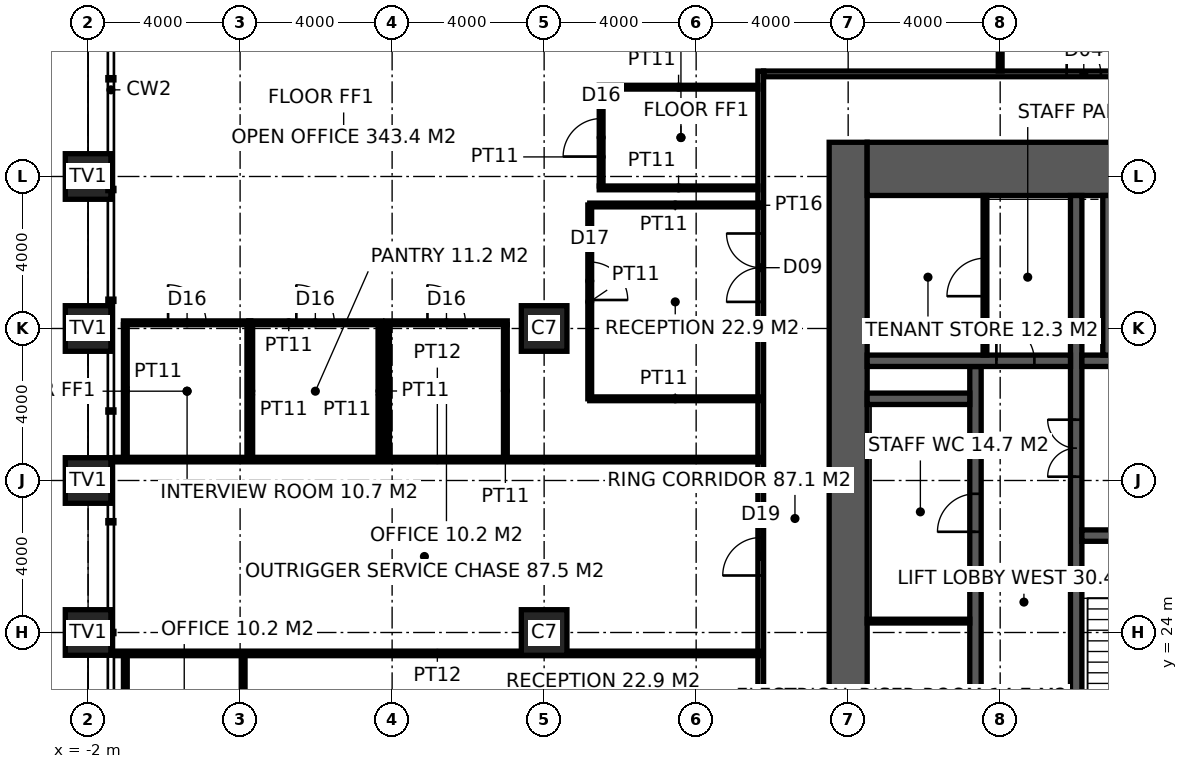
"""IFC4 building model, lengths in metres.
Left out: names, types, materials, properties, quantities, classifications, styles, units other than length and angle.
Written with IfcOpenShell. Run it as: python <this file> out.ifc"""

import sys

from ifc_helpers import new_model, si_unit, direction, frame, frame_2d, origin, origin_2d, place, context, subcontext, project, spatial, rectangle, hollow_rectangle, extrude, element, fill, save


model = new_model("IFC4")
c1 = context("Model", 3, precision=1e-05, world=origin(), true_north=direction((0.0, 1.0)))
c2 = subcontext(c1, "Body", "Model", "MODEL_VIEW")
j1 = project(units=[si_unit("LENGTHUNIT", "METRE"), si_unit("PLANEANGLEUNIT", "RADIAN")], contexts=[c1])
p1 = place(None, origin())
s1 = spatial("IfcSite", under=j1, at=p1, CompositionType="ELEMENT")
p2 = place(p1, origin())
s2 = spatial("IfcBuilding", under=s1, at=p2, CompositionType="ELEMENT")
p3 = place(p2, frame((0.0, 0.0, 43.0)))
s3 = spatial("IfcBuildingStorey", under=s2, at=p3, CompositionType="ELEMENT", Elevation=43.0)
for number, where, z_axis, x_axis in (
    (1, (-2.0, 24.0, 0.0), (0.0, 0.0, 1.0), (1.0, 0.0, 0.0)),
    (2, (-2.0, 28.0, 0.0), (0.0, 0.0, 1.0), (1.0, 0.0, 0.0)),
    (3, (-2.0, 32.0, 0.0), (0.0, 0.0, 1.0), (1.0, 0.0, 0.0)),
    (4, (-2.0, 36.0, 0.0), (0.0, 0.0, 1.0), (1.0, 0.0, 0.0)),
):
    element("IfcColumn", number, at=place(p3, frame(where, z_axis=z_axis, x_axis=x_axis)), inside=s3, PredefinedType="USERDEFINED", context=c2, shape_type="SweptSolid", body=[
        extrude(hollow_rectangle(XDim=1.2, YDim=1.2, WallThickness=0.1, at=origin_2d()), origin(), (0.0, 0.0, 1.0), 4.0),
    ])
for number, where, z_axis, x_axis in (
    (5, (10.0, 24.0, 0.0), (0.0, 0.0, 1.0), (1.0, 0.0, 0.0)),
    (6, (10.0, 32.0, 0.0), (0.0, 0.0, 1.0), (1.0, 0.0, 0.0)),
):
    element("IfcColumn", number, at=place(p3, frame(where, z_axis=z_axis, x_axis=x_axis)), inside=s3, PredefinedType="COLUMN", context=c2, shape_type="SweptSolid", body=[
        extrude(hollow_rectangle(XDim=1.2, YDim=1.2, WallThickness=0.1, at=origin_2d()), origin(), (0.0, 0.0, 1.0), 4.0),
    ])
p4 = place(p3, frame((18.0, 17.1, -0.15), z_axis=(0.0, 0.0, 1.0), x_axis=(0.0, 1.0, 0.0)))
e7 = element("IfcWall", 7, at=p4, inside=s3, PredefinedType="SHEAR", context=c2, shape_type="SweptSolid", body=[
    extrude(rectangle(XDim=19.8, YDim=1.0, at=frame_2d((9.9, 0.0))), origin(), (0.0, 0.0, 1.0), 4.0),
])
p5 = place(p3, frame((18.5, 36.2, -0.15), z_axis=(0.0, 0.0, 1.0), x_axis=(1.0, 0.0, 0.0)))
e8 = element("IfcWall", 8, at=p5, inside=s3, PredefinedType="SHEAR", context=c2, shape_type="SweptSolid", body=[
    extrude(rectangle(XDim=23.4, YDim=1.4, at=frame_2d((11.7, 0.0))), origin(), (0.0, 0.0, 1.0), 4.0),
])
p6 = place(p3, frame((24.0, 18.5, -0.15), z_axis=(0.0, 0.0, 1.0), x_axis=(0.0, 1.0, 0.0)))
e9 = element("IfcWall", 9, at=p6, inside=s3, PredefinedType="SHEAR", context=c2, shape_type="SweptSolid", body=[
    extrude(rectangle(XDim=17.0, YDim=0.3, at=frame_2d((8.5, 0.0))), origin(), (0.0, 0.0, 1.0), 4.0),
])
p7 = place(p6, frame((9.6, 0.0, 0.15)))
e10 = element("IfcOpeningElement", 10, at=p7, cuts=e9, PredefinedType="OPENING", context=c2, shape_type="SweptSolid", body=[
    extrude(rectangle(XDim=1.5, YDim=2.4, at=frame_2d((0.75, 1.2))), frame((0.0, 0.16, 0.0), z_axis=(0.0, -1.0, 0.0), x_axis=(1.0, 0.0, 0.0)), (0.0, 0.0, 1.0), 0.32),
])
p8 = place(p3, frame((24.15, 26.55, -0.15), z_axis=(0.0, 0.0, 1.0), x_axis=(1.0, 0.0, 0.0)))
e11 = element("IfcWall", 11, at=p8, inside=s3, PredefinedType="SHEAR", context=c2, shape_type="SweptSolid", body=[
    extrude(rectangle(XDim=11.25, YDim=0.3, at=frame_2d((5.625, 0.0))), origin(), (0.0, 0.0, 1.0), 4.0),
])
p9 = place(p8, frame((9.25, 0.0, 0.15)))
e12 = element("IfcOpeningElement", 12, at=p9, cuts=e11, PredefinedType="OPENING", context=c2, shape_type="SweptSolid", body=[
    extrude(rectangle(XDim=1.0, YDim=2.2, at=frame_2d((0.5, 1.1))), frame((0.0, 0.16, 0.0), z_axis=(0.0, -1.0, 0.0), x_axis=(1.0, 0.0, 0.0)), (0.0, 0.0, 1.0), 0.32),
])
p10 = place(p8, frame((4.9, 0.0, 0.15)))
e13 = element("IfcOpeningElement", 13, at=p10, cuts=e11, PredefinedType="OPENING", context=c2, shape_type="SweptSolid", body=[
    extrude(rectangle(XDim=1.5, YDim=2.4, at=frame_2d((0.75, 1.2))), frame((0.0, 0.16, 0.0), z_axis=(0.0, -1.0, 0.0), x_axis=(1.0, 0.0, 0.0)), (0.0, 0.0, 1.0), 0.32),
])
p11 = place(p3, frame((24.15, 31.15, -0.15), z_axis=(0.0, 0.0, 1.0), x_axis=(1.0, 0.0, 0.0)))
e14 = element("IfcWall", 14, at=p11, inside=s3, PredefinedType="SHEAR", context=c2, shape_type="SweptSolid", body=[
    extrude(rectangle(XDim=11.25, YDim=0.3, at=frame_2d((5.625, 0.0))), origin(), (0.0, 0.0, 1.0), 4.0),
])
p12 = place(p11, frame((7.25, 0.0, 0.15)))
e15 = element("IfcOpeningElement", 15, at=p12, cuts=e14, PredefinedType="OPENING", context=c2, shape_type="SweptSolid", body=[
    extrude(rectangle(XDim=1.4, YDim=2.4, at=frame_2d((0.7, 1.2))), frame((0.0, 0.16, 0.0), z_axis=(0.0, -1.0, 0.0), x_axis=(1.0, 0.0, 0.0)), (0.0, 0.0, 1.0), 0.32),
])
p13 = place(p3, frame((21.35, 18.5, -0.15), z_axis=(0.0, 0.0, 1.0), x_axis=(0.0, 1.0, 0.0)))
e16 = element("IfcWall", 16, at=p13, inside=s3, PredefinedType="SHEAR", context=c2, shape_type="SweptSolid", body=[
    extrude(rectangle(XDim=12.5, YDim=0.3, at=frame_2d((6.25, 0.0))), origin(), (0.0, 0.0, 1.0), 4.0),
])
p14 = place(p13, frame((8.15, 0.0, 0.15)))
e17 = element("IfcOpeningElement", 17, at=p14, cuts=e16, PredefinedType="OPENING", context=c2, shape_type="SweptSolid", body=[
    extrude(rectangle(XDim=1.0, YDim=2.2, at=frame_2d((0.5, 1.1))), frame((0.0, 0.16, 0.0), z_axis=(0.0, -1.0, 0.0), x_axis=(1.0, 0.0, 0.0)), (0.0, 0.0, 1.0), 0.32),
])
p15 = place(p3, frame((18.5, 31.15, -0.15), z_axis=(0.0, 0.0, 1.0), x_axis=(1.0, 0.0, 0.0)))
e18 = element("IfcWall", 18, at=p15, inside=s3, PredefinedType="SHEAR", context=c2, shape_type="SweptSolid", body=[
    extrude(rectangle(XDim=5.35, YDim=0.3, at=frame_2d((2.675, 0.0))), origin(), (0.0, 0.0, 1.0), 4.0),
])
p16 = place(p15, frame((3.4, 0.0, 0.15)))
e19 = element("IfcOpeningElement", 19, at=p16, cuts=e18, PredefinedType="OPENING", context=c2, shape_type="SweptSolid", body=[
    extrude(rectangle(XDim=1.0, YDim=2.2, at=frame_2d((0.5, 1.1))), frame((0.0, 0.16, 0.0), z_axis=(0.0, -1.0, 0.0), x_axis=(1.0, 0.0, 0.0)), (0.0, 0.0, 1.0), 0.32),
])
p17 = place(p3, frame((18.5, 30.15, -0.15), z_axis=(0.0, 0.0, 1.0), x_axis=(1.0, 0.0, 0.0)))
e20 = element("IfcWall", 20, at=p17, inside=s3, PredefinedType="SHEAR", context=c2, shape_type="SweptSolid", body=[
    extrude(rectangle(XDim=2.7, YDim=0.3, at=frame_2d((1.35, 0.0))), origin(), (0.0, 0.0, 1.0), 4.0),
])
p18 = place(p3, frame((24.85, 31.3, -0.15), z_axis=(0.0, 0.0, 1.0), x_axis=(0.0, 1.0, 0.0)))
e21 = element("IfcWall", 21, at=p18, inside=s3, PredefinedType="SHEAR", context=c2, shape_type="SweptSolid", body=[
    extrude(rectangle(XDim=4.2, YDim=0.3, at=frame_2d((2.1, 0.0))), origin(), (0.0, 0.0, 1.0), 4.0),
])
p19 = place(p3, frame((21.6, 31.3, 0.0), z_axis=(0.0, 0.0, 1.0), x_axis=(0.0, 1.0, 0.0)))
e22 = element("IfcWall", 22, at=p19, inside=s3, PredefinedType="PARTITIONING", context=c2, shape_type="SweptSolid", body=[
    extrude(rectangle(XDim=4.2, YDim=0.1, at=frame_2d((2.1, 0.0))), origin(), (0.0, 0.0, 1.0), 3.85),
])
p20 = place(p19, frame((1.55, 0.0, 0.0)))
e23 = element("IfcOpeningElement", 23, at=p20, cuts=e22, PredefinedType="OPENING", context=c2, shape_type="SweptSolid", body=[
    extrude(rectangle(XDim=1.0, YDim=2.2, at=frame_2d((0.5, 1.1))), frame((0.0, 0.06, 0.0), z_axis=(0.0, -1.0, 0.0), x_axis=(1.0, 0.0, 0.0)), (0.0, 0.0, 1.0), 0.12),
])
p21 = place(p3, frame((18.5, 24.3, 0.0), z_axis=(0.0, 0.0, 1.0), x_axis=(1.0, 0.0, 0.0)))
e24 = element("IfcWall", 24, at=p21, inside=s3, PredefinedType="PARTITIONING", context=c2, shape_type="SweptSolid", body=[
    extrude(rectangle(XDim=2.7, YDim=0.1, at=frame_2d((1.35, 0.0))), origin(), (0.0, 0.0, 1.0), 3.85),
])
p22 = place(p3, frame((15.7, 15.225, 0.0), z_axis=(0.0, 0.0, 1.0), x_axis=(0.0, 1.0, 0.0)))
e25 = element("IfcWall", 25, at=p22, inside=s3, PredefinedType="PARTITIONING", context=c2, shape_type="SweptSolid", body=[
    extrude(rectangle(XDim=23.55, YDim=0.15, at=frame_2d((11.775, 0.0))), origin(), (0.0, 0.0, 1.0), 3.85),
])
p23 = place(p22, frame((3.274, 0.0, 0.0)))
e26 = element("IfcOpeningElement", 26, at=p23, cuts=e25, PredefinedType="OPENING", context=c2, shape_type="SweptSolid", body=[
    extrude(rectangle(XDim=1.8, YDim=2.4, at=frame_2d((0.9, 1.2))), frame((0.0, 0.085, 0.0), z_axis=(0.0, -1.0, 0.0), x_axis=(1.0, 0.0, 0.0)), (0.0, 0.0, 1.0), 0.17),
])
p24 = place(p22, frame((17.475, 0.0, 0.0)))
e27 = element("IfcOpeningElement", 27, at=p24, cuts=e25, PredefinedType="OPENING", context=c2, shape_type="SweptSolid", body=[
    extrude(rectangle(XDim=1.8, YDim=2.4, at=frame_2d((0.9, 1.2))), frame((0.0, 0.085, 0.0), z_axis=(0.0, -1.0, 0.0), x_axis=(1.0, 0.0, 0.0)), (0.0, 0.0, 1.0), 0.17),
])
p25 = place(p22, frame((10.275, 0.0, 0.0)))
e28 = element("IfcOpeningElement", 28, at=p25, cuts=e25, PredefinedType="OPENING", context=c2, shape_type="SweptSolid", body=[
    extrude(rectangle(XDim=1.0, YDim=2.2, at=frame_2d((0.5, 1.1))), frame((0.0, 0.085, 0.0), z_axis=(0.0, -1.0, 0.0), x_axis=(1.0, 0.0, 0.0)), (0.0, 0.0, 1.0), 0.17),
])
p26 = place(p3, frame((15.775, 38.7, 0.0), z_axis=(0.0, 0.0, 1.0), x_axis=(1.0, 0.0, 0.0)))
e29 = element("IfcWall", 29, at=p26, inside=s3, PredefinedType="PARTITIONING", context=c2, shape_type="SweptSolid", body=[
    extrude(rectangle(XDim=28.45, YDim=0.15, at=frame_2d((14.225, 0.0))), origin(), (0.0, 0.0, 1.0), 3.85),
])
p27 = place(p26, frame((7.975, 0.0, 0.0)))
e30 = element("IfcOpeningElement", 30, at=p27, cuts=e29, PredefinedType="OPENING", context=c2, shape_type="SweptSolid", body=[
    extrude(rectangle(XDim=0.9, YDim=2.1, at=frame_2d((0.45, 1.05))), frame((0.0, 0.085, 0.0), z_axis=(0.0, -1.0, 0.0), x_axis=(1.0, 0.0, 0.0)), (0.0, 0.0, 1.0), 0.17),
])
p28 = place(p26, frame((11.725, 0.0, 0.0)))
e31 = element("IfcOpeningElement", 31, at=p28, cuts=e29, PredefinedType="OPENING", context=c2, shape_type="SweptSolid", body=[
    extrude(rectangle(XDim=1.0, YDim=2.1, at=frame_2d((0.5, 1.05))), frame((0.0, 0.085, 0.0), z_axis=(0.0, -1.0, 0.0), x_axis=(1.0, 0.0, 0.0)), (0.0, 0.0, 1.0), 0.17),
])
p29 = place(p26, frame((15.575, 0.0, 0.0)))
e32 = element("IfcOpeningElement", 32, at=p29, cuts=e29, PredefinedType="OPENING", context=c2, shape_type="SweptSolid", body=[
    extrude(rectangle(XDim=0.9, YDim=2.1, at=frame_2d((0.45, 1.05))), frame((0.0, 0.085, 0.0), z_axis=(0.0, -1.0, 0.0), x_axis=(1.0, 0.0, 0.0)), (0.0, 0.0, 1.0), 0.17),
])
p30 = place(p3, frame((22.0, 38.775, 0.0), z_axis=(0.0, 0.0, 1.0), x_axis=(0.0, 1.0, 0.0)))
e33 = element("IfcWall", 33, at=p30, inside=s3, PredefinedType="PARTITIONING", context=c2, shape_type="SweptSolid", body=[
    extrude(rectangle(XDim=3.275, YDim=0.1, at=frame_2d((1.638, 0.0))), origin(), (0.0, 0.0, 1.0), 2.85),
])
for number, where, z_axis, x_axis in (
    (34, (-1.32, 23.45, 0.0), (0.0, 0.0, 1.0), (1.0, 0.0, 0.0)),
    (35, (-1.32, 28.55, 0.0), (0.0, 0.0, 1.0), (1.0, 0.0, 0.0)),
):
    element("IfcWall", number, at=place(p3, frame(where, z_axis=z_axis, x_axis=x_axis)), inside=s3, PredefinedType="PARTITIONING", context=c2, shape_type="SweptSolid", body=[
        extrude(rectangle(XDim=17.02, YDim=0.12, at=frame_2d((8.51, 0.0))), origin(), (0.0, 0.0, 1.0), 2.65),
    ])
p31 = place(p3, frame((-1.07, 32.15, 0.0), z_axis=(0.0, 0.0, 1.0), x_axis=(1.0, 0.0, 0.0)))
e36 = element("IfcWall", 36, at=p31, inside=s3, PredefinedType="PARTITIONING", context=c2, shape_type="SweptSolid", body=[
    extrude(rectangle(XDim=3.35, YDim=0.1, at=frame_2d((1.675, 0.0))), origin(), (0.0, 0.0, 1.0), 2.95),
])
p32 = place(p31, frame((1.175, 0.0, 0.0)))
e37 = element("IfcOpeningElement", 37, at=p32, cuts=e36, PredefinedType="OPENING", context=c2, shape_type="SweptSolid", body=[
    extrude(rectangle(XDim=1.0, YDim=2.2, at=frame_2d((0.5, 1.1))), frame((0.0, 0.06, 0.0), z_axis=(0.0, -1.0, 0.0), x_axis=(1.0, 0.0, 0.0)), (0.0, 0.0, 1.0), 0.12),
])
p33 = place(p3, frame((2.23, 32.15, 0.0), z_axis=(0.0, 0.0, 1.0), x_axis=(1.0, 0.0, 0.0)))
e38 = element("IfcWall", 38, at=p33, inside=s3, PredefinedType="PARTITIONING", context=c2, shape_type="SweptSolid", body=[
    extrude(rectangle(XDim=3.5, YDim=0.1, at=frame_2d((1.75, 0.0))), origin(), (0.0, 0.0, 1.0), 2.95),
])
p34 = place(p33, frame((1.25, 0.0, 0.0)))
e39 = element("IfcOpeningElement", 39, at=p34, cuts=e38, PredefinedType="OPENING", context=c2, shape_type="SweptSolid", body=[
    extrude(rectangle(XDim=1.0, YDim=2.2, at=frame_2d((0.5, 1.1))), frame((0.0, 0.06, 0.0), z_axis=(0.0, -1.0, 0.0), x_axis=(1.0, 0.0, 0.0)), (0.0, 0.0, 1.0), 0.12),
])
p35 = place(p3, frame((5.83, 32.15, 0.0), z_axis=(0.0, 0.0, 1.0), x_axis=(1.0, 0.0, 0.0)))
e40 = element("IfcWall", 40, at=p35, inside=s3, PredefinedType="PARTITIONING", context=c2, shape_type="SweptSolid", body=[
    extrude(rectangle(XDim=3.2, YDim=0.1, at=frame_2d((1.6, 0.0))), origin(), (0.0, 0.0, 1.0), 2.95),
])
p36 = place(p35, frame((1.1, 0.0, 0.0)))
e41 = element("IfcOpeningElement", 41, at=p36, cuts=e40, PredefinedType="OPENING", context=c2, shape_type="SweptSolid", body=[
    extrude(rectangle(XDim=1.0, YDim=2.2, at=frame_2d((0.5, 1.1))), frame((0.0, 0.06, 0.0), z_axis=(0.0, -1.0, 0.0), x_axis=(1.0, 0.0, 0.0)), (0.0, 0.0, 1.0), 0.12),
])
p37 = place(p3, frame((11.45, 35.7, 0.0), z_axis=(0.0, 0.0, 1.0), x_axis=(1.0, 0.0, 0.0)))
e42 = element("IfcWall", 42, at=p37, inside=s3, PredefinedType="PARTITIONING", context=c2, shape_type="SweptSolid", body=[
    extrude(rectangle(XDim=4.175, YDim=0.1, at=frame_2d((2.087, 0.0))), origin(), (0.0, 0.0, 1.0), 2.85),
])
p38 = place(p3, frame((11.45, 38.35, 0.0), z_axis=(0.0, 0.0, 1.0), x_axis=(1.0, 0.0, 0.0)))
e43 = element("IfcWall", 43, at=p38, inside=s3, PredefinedType="PARTITIONING", context=c2, shape_type="SweptSolid", body=[
    extrude(rectangle(XDim=4.175, YDim=0.1, at=frame_2d((2.087, 0.0))), origin(), (0.0, 0.0, 1.0), 3.85),
])
for number, where, z_axis, x_axis in (
    (44, (-1.02, 19.9, 0.0), (0.0, 0.0, 1.0), (0.0, 1.0, 0.0)),
    (45, (-1.02, 28.61, 0.0), (0.0, 0.0, 1.0), (0.0, 1.0, 0.0)),
    (46, (2.08, 19.9, 0.0), (0.0, 0.0, 1.0), (0.0, 1.0, 0.0)),
    (47, (2.23, 28.61, 0.0), (0.0, 0.0, 1.0), (0.0, 1.0, 0.0)),
    (48, (2.28, 28.61, 0.0), (0.0, 0.0, 1.0), (0.0, 1.0, 0.0)),
    (49, (5.68, 28.61, 0.0), (0.0, 0.0, 1.0), (0.0, 1.0, 0.0)),
    (50, (5.88, 28.61, 0.0), (0.0, 0.0, 1.0), (0.0, 1.0, 0.0)),
    (51, (8.98, 28.61, 0.0), (0.0, 0.0, 1.0), (0.0, 1.0, 0.0)),
):
    element("IfcWall", number, at=place(p3, frame(where, z_axis=z_axis, x_axis=x_axis)), inside=s3, PredefinedType="PARTITIONING", context=c2, shape_type="SweptSolid", body=[
        extrude(rectangle(XDim=3.49, YDim=0.1, at=frame_2d((1.745, 0.0))), origin(), (0.0, 0.0, 1.0), 3.85),
    ])
p39 = place(p3, frame((11.5, 35.75, 0.0), z_axis=(0.0, 0.0, 1.0), x_axis=(0.0, 1.0, 0.0)))
e52 = element("IfcWall", 52, at=p39, inside=s3, PredefinedType="PARTITIONING", context=c2, shape_type="SweptSolid", body=[
    extrude(rectangle(XDim=2.55, YDim=0.1, at=frame_2d((1.275, 0.0))), origin(), (0.0, 0.0, 1.0), 3.85),
])
p40 = place(p39, frame((0.775, 0.0, 0.0)))
e53 = element("IfcOpeningElement", 53, at=p40, cuts=e52, PredefinedType="OPENING", context=c2, shape_type="SweptSolid", body=[
    extrude(rectangle(XDim=1.0, YDim=2.2, at=frame_2d((0.5, 1.1))), frame((0.0, 0.06, 0.0), z_axis=(0.0, -1.0, 0.0), x_axis=(1.0, 0.0, 0.0)), (0.0, 0.0, 1.0), 0.12),
])
p41 = place(p3, frame((15.7, 35.25, 0.0), z_axis=(0.0, 0.0, 1.0), x_axis=(-1.0, 0.0, 0.0)))
e54 = element("IfcWall", 54, at=p41, inside=s3, PredefinedType="PARTITIONING", context=c2, shape_type="SweptSolid", body=[
    extrude(rectangle(XDim=4.5, YDim=0.1, at=frame_2d((2.25, 0.0))), origin(), (0.0, 0.0, 1.0), 3.85),
])
p42 = place(p3, frame((11.2, 35.25, 0.0), z_axis=(0.0, 0.0, 1.0), x_axis=(0.0, -1.0, 0.0)))
e55 = element("IfcWall", 55, at=p42, inside=s3, PredefinedType="PARTITIONING", context=c2, shape_type="SweptSolid", body=[
    extrude(rectangle(XDim=5.1, YDim=0.1, at=frame_2d((2.55, 0.0))), origin(), (0.0, 0.0, 1.0), 3.85),
])
p43 = place(p42, frame((1.5, 0.0, 0.0)))
e56 = element("IfcOpeningElement", 56, at=p43, cuts=e55, PredefinedType="OPENING", context=c2, shape_type="SweptSolid", body=[
    extrude(rectangle(XDim=1.0, YDim=2.2, at=frame_2d((0.5, 1.1))), frame((0.0, 0.06, 0.0), z_axis=(0.0, -1.0, 0.0), x_axis=(1.0, 0.0, 0.0)), (0.0, 0.0, 1.0), 0.12),
])
p44 = place(p3, frame((11.2, 30.15, 0.0), z_axis=(0.0, 0.0, 1.0), x_axis=(1.0, 0.0, 0.0)))
e57 = element("IfcWall", 57, at=p44, inside=s3, PredefinedType="PARTITIONING", context=c2, shape_type="SweptSolid", body=[
    extrude(rectangle(XDim=4.5, YDim=0.1, at=frame_2d((2.25, 0.0))), origin(), (0.0, 0.0, 1.0), 3.85),
])
p45 = place(p7, origin())
e58 = element("IfcDoor", 58, at=p45, inside=s3, OperationType="DOUBLE_DOOR_DOUBLE_SWING", PredefinedType="DOOR", context=c2, shape_type="SweptSolid", body=[
    extrude(rectangle(XDim=1.5, YDim=2.4, at=frame_2d((0.75, 1.2))), frame((0.0, 0.025, 0.0), z_axis=(0.0, -1.0, 0.0), x_axis=(1.0, 0.0, 0.0)), (0.0, 0.0, 1.0), 0.05),
])
fill(e10, e58)
p46 = place(p16, origin())
e59 = element("IfcDoor", 59, at=p46, inside=s3, OperationType="SINGLE_SWING_LEFT", PredefinedType="DOOR", context=c2, shape_type="SweptSolid", body=[
    extrude(rectangle(XDim=1.0, YDim=2.2, at=frame_2d((0.5, 1.1))), frame((0.0, 0.025, 0.0), z_axis=(0.0, -1.0, 0.0), x_axis=(1.0, 0.0, 0.0)), (0.0, 0.0, 1.0), 0.05),
])
fill(e19, e59)
p47 = place(p20, origin())
e60 = element("IfcDoor", 60, at=p47, inside=s3, OperationType="SINGLE_SWING_LEFT", PredefinedType="DOOR", context=c2, shape_type="SweptSolid", body=[
    extrude(rectangle(XDim=1.0, YDim=2.2, at=frame_2d((0.5, 1.1))), frame((0.0, 0.025, 0.0), z_axis=(0.0, -1.0, 0.0), x_axis=(1.0, 0.0, 0.0)), (0.0, 0.0, 1.0), 0.05),
])
fill(e23, e60)
p48 = place(p14, origin())
e61 = element("IfcDoor", 61, at=p48, inside=s3, OperationType="SINGLE_SWING_LEFT", PredefinedType="DOOR", context=c2, shape_type="SweptSolid", body=[
    extrude(rectangle(XDim=1.0, YDim=2.2, at=frame_2d((0.5, 1.1))), frame((0.0, 0.025, 0.0), z_axis=(0.0, -1.0, 0.0), x_axis=(1.0, 0.0, 0.0)), (0.0, 0.0, 1.0), 0.05),
])
fill(e17, e61)
p49 = place(p27, origin())
e62 = element("IfcDoor", 62, at=p49, inside=s3, OperationType="SINGLE_SWING_LEFT", PredefinedType="DOOR", context=c2, shape_type="SweptSolid", body=[
    extrude(rectangle(XDim=0.9, YDim=2.1, at=frame_2d((0.45, 1.05))), frame((0.0, 0.025, 0.0), z_axis=(0.0, -1.0, 0.0), x_axis=(1.0, 0.0, 0.0)), (0.0, 0.0, 1.0), 0.05),
])
fill(e30, e62)
p50 = place(p24, origin())
e63 = element("IfcDoor", 63, at=p50, inside=s3, OperationType="DOUBLE_DOOR_DOUBLE_SWING", PredefinedType="DOOR", context=c2, shape_type="SweptSolid", body=[
    extrude(rectangle(XDim=1.8, YDim=2.4, at=frame_2d((0.9, 1.2))), frame((0.0, 0.025, 0.0), z_axis=(0.0, -1.0, 0.0), x_axis=(1.0, 0.0, 0.0)), (0.0, 0.0, 1.0), 0.05),
])
fill(e27, e63)
p51 = place(p25, origin())
e64 = element("IfcDoor", 64, at=p51, inside=s3, OperationType="SINGLE_SWING_LEFT", PredefinedType="DOOR", context=c2, shape_type="SweptSolid", body=[
    extrude(rectangle(XDim=1.0, YDim=2.2, at=frame_2d((0.5, 1.1))), frame((0.0, 0.025, 0.0), z_axis=(0.0, -1.0, 0.0), x_axis=(1.0, 0.0, 0.0)), (0.0, 0.0, 1.0), 0.05),
])
fill(e28, e64)
p52 = place(p32, origin())
e65 = element("IfcDoor", 65, at=p52, inside=s3, OperationType="SINGLE_SWING_LEFT", PredefinedType="DOOR", context=c2, shape_type="SweptSolid", body=[
    extrude(rectangle(XDim=1.0, YDim=2.2, at=frame_2d((0.5, 1.1))), frame((0.0, 0.025, 0.0), z_axis=(0.0, -1.0, 0.0), x_axis=(1.0, 0.0, 0.0)), (0.0, 0.0, 1.0), 0.05),
])
fill(e37, e65)
p53 = place(p34, origin())
e66 = element("IfcDoor", 66, at=p53, inside=s3, OperationType="SINGLE_SWING_LEFT", PredefinedType="DOOR", context=c2, shape_type="SweptSolid", body=[
    extrude(rectangle(XDim=1.0, YDim=2.2, at=frame_2d((0.5, 1.1))), frame((0.0, 0.025, 0.0), z_axis=(0.0, -1.0, 0.0), x_axis=(1.0, 0.0, 0.0)), (0.0, 0.0, 1.0), 0.05),
])
fill(e39, e66)
p54 = place(p40, origin())
e67 = element("IfcDoor", 67, at=p54, inside=s3, OperationType="SINGLE_SWING_LEFT", PredefinedType="DOOR", context=c2, shape_type="SweptSolid", body=[
    extrude(rectangle(XDim=1.0, YDim=2.2, at=frame_2d((0.5, 1.1))), frame((0.0, 0.025, 0.0), z_axis=(0.0, -1.0, 0.0), x_axis=(1.0, 0.0, 0.0)), (0.0, 0.0, 1.0), 0.05),
])
fill(e53, e67)
p55 = place(p36, origin())
e68 = element("IfcDoor", 68, at=p55, inside=s3, OperationType="SINGLE_SWING_LEFT", PredefinedType="DOOR", context=c2, shape_type="SweptSolid", body=[
    extrude(rectangle(XDim=1.0, YDim=2.2, at=frame_2d((0.5, 1.1))), frame((0.0, 0.025, 0.0), z_axis=(0.0, -1.0, 0.0), x_axis=(1.0, 0.0, 0.0)), (0.0, 0.0, 1.0), 0.05),
])
fill(e41, e68)
p56 = place(p43, origin())
e69 = element("IfcDoor", 69, at=p56, inside=s3, OperationType="SINGLE_SWING_RIGHT", PredefinedType="DOOR", context=c2, shape_type="SweptSolid", body=[
    extrude(rectangle(XDim=1.0, YDim=2.2, at=frame_2d((0.5, 1.1))), frame((0.0, 0.025, 0.0), z_axis=(0.0, -1.0, 0.0), x_axis=(1.0, 0.0, 0.0)), (0.0, 0.0, 1.0), 0.05),
])
fill(e56, e69)
save(model, sys.argv[1])
